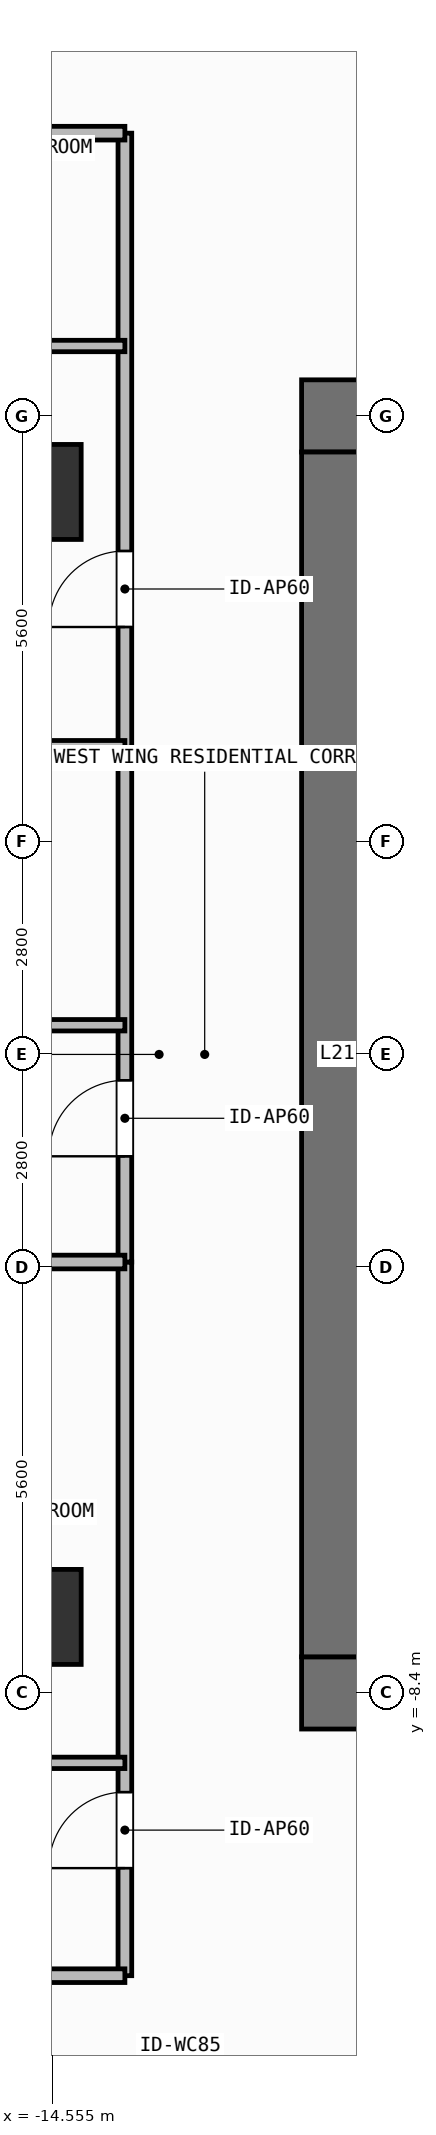
"""IFC4 building model, lengths in metres.
Left out: names, types, materials, properties, quantities, classifications, styles, units other than length and angle.
Written with IfcOpenShell. Run it as: python <this file> out.ifc"""

import sys

from ifc_helpers import new_model, si_unit, direction, frame, frame_2d, origin, origin_2d, place, context, subcontext, project, spatial, rectangle, extrude, element, fill, save


model = new_model("IFC4")
c1 = context("Model", 3, precision=1e-05, world=origin(), true_north=direction((0.0, 1.0)))
c2 = subcontext(c1, "Body", "Model", "MODEL_VIEW")
j1 = project(units=[si_unit("LENGTHUNIT", "METRE"), si_unit("PLANEANGLEUNIT", "RADIAN")], contexts=[c1])
p1 = place(None, origin())
s1 = spatial("IfcSite", under=j1, at=p1, CompositionType="ELEMENT")
p2 = place(p1, origin())
s2 = spatial("IfcBuilding", under=s1, at=p2, CompositionType="ELEMENT")
p3 = place(p2, frame((0.0, 0.0, 85.2)))
s3 = spatial("IfcBuildingStorey", under=s2, at=p3, CompositionType="ELEMENT", Elevation=85.2)
for number, where, z_axis, x_axis in (
    (1, (-11.275, -8.4, 0.0), (0.0, 0.0, 1.0), (1.0, 0.0, 0.0)),
    (2, (-11.275, 8.4, 0.0), (0.0, 0.0, 1.0), (1.0, 0.0, 0.0)),
):
    element("IfcWall", number, at=place(p3, frame(where, z_axis=z_axis, x_axis=x_axis)), inside=s3, PredefinedType="SHEAR", context=c2, shape_type="SweptSolid", body=[
        extrude(rectangle(XDim=1.575, YDim=0.95, at=frame_2d((0.788, 0.0))), origin(), (0.0, 0.0, 1.0), 3.9),
    ])
p4 = place(p3, frame((-10.8, -7.925, 0.0), z_axis=(0.0, 0.0, 1.0), x_axis=(0.0, 1.0, 0.0)))
e3 = element("IfcWall", 3, at=p4, inside=s3, PredefinedType="SHEAR", context=c2, shape_type="SweptSolid", body=[
    extrude(rectangle(XDim=15.85, YDim=0.95, at=frame_2d((7.925, 0.0))), origin(), (0.0, 0.0, 1.0), 3.9),
])
for number, where, z_axis, x_axis in (
    (4, (-14.8, -7.4, 0.0), (0.0, 0.0, 1.0), (1.0, 0.0, 0.0)),
    (5, (-14.8, 7.4, 0.0), (0.0, 0.0, 1.0), (1.0, 0.0, 0.0)),
):
    element("IfcColumn", number, at=place(p3, frame(where, z_axis=z_axis, x_axis=x_axis)), inside=s3, PredefinedType="COLUMN", context=c2, shape_type="SweptSolid", body=[
        extrude(rectangle(XDim=1.25, YDim=1.25, at=origin_2d()), origin(), (0.0, 0.0, 1.0), 3.9),
    ])
p5 = place(p3, frame((-13.6, -12.12, 0.0), z_axis=(0.0, 0.0, 1.0), x_axis=(0.0, 1.0, 0.0)))
e6 = element("IfcWall", 6, at=p5, inside=s3, PredefinedType="PARTITIONING", context=c2, shape_type="SweptSolid", body=[
    extrude(rectangle(XDim=9.389, YDim=0.18, at=frame_2d((4.695, 0.0))), origin(), (0.0, 0.0, 1.0), 3.68),
])
p6 = place(p5, frame((1.415, 0.0, 0.0)))
e7 = element("IfcOpeningElement", 7, at=p6, cuts=e6, PredefinedType="OPENING", context=c2, shape_type="SweptSolid", body=[
    extrude(rectangle(XDim=1.0, YDim=2.2, at=frame_2d((0.5, 1.1))), frame((0.0, 0.1, 0.0), z_axis=(0.0, -1.0, 0.0), x_axis=(1.0, 0.0, 0.0)), (0.0, 0.0, 1.0), 0.2),
])
p7 = place(p3, frame((-16.863, -9.32, 0.0), z_axis=(0.0, 0.0, 1.0), x_axis=(1.0, 0.0, 0.0)))
e8 = element("IfcWall", 8, at=p7, inside=s3, PredefinedType="PARTITIONING", context=c2, shape_type="SweptSolid", body=[
    extrude(rectangle(XDim=3.263, YDim=0.15, at=frame_2d((1.631, 0.0))), origin(), (0.0, 0.0, 1.0), 3.68),
])
p8 = place(p7, frame((0.509, 0.0, 0.0)))
e9 = element("IfcOpeningElement", 9, at=p8, cuts=e8, PredefinedType="OPENING", context=c2, shape_type="SweptSolid", body=[
    extrude(rectangle(XDim=0.85, YDim=2.1, at=frame_2d((0.425, 1.05))), frame((0.0, 0.085, 0.0), z_axis=(0.0, -1.0, 0.0), x_axis=(1.0, 0.0, 0.0)), (0.0, 0.0, 1.0), 0.17),
])
p9 = place(p3, frame((-13.6, -2.731, 0.0), z_axis=(0.0, 0.0, 1.0), x_axis=(0.0, 1.0, 0.0)))
e10 = element("IfcWall", 10, at=p9, inside=s3, PredefinedType="PARTITIONING", context=c2, shape_type="SweptSolid", body=[
    extrude(rectangle(XDim=6.771, YDim=0.18, at=frame_2d((3.385, 0.0))), origin(), (0.0, 0.0, 1.0), 3.68),
])
p10 = place(p9, frame((1.391, 0.0, 0.0)))
e11 = element("IfcOpeningElement", 11, at=p10, cuts=e10, PredefinedType="OPENING", context=c2, shape_type="SweptSolid", body=[
    extrude(rectangle(XDim=1.0, YDim=2.2, at=frame_2d((0.5, 1.1))), frame((0.0, 0.1, 0.0), z_axis=(0.0, -1.0, 0.0), x_axis=(1.0, 0.0, 0.0)), (0.0, 0.0, 1.0), 0.2),
])
p11 = place(p3, frame((-16.902, 0.384, 0.0), z_axis=(0.0, 0.0, 1.0), x_axis=(1.0, 0.0, 0.0)))
e12 = element("IfcWall", 12, at=p11, inside=s3, PredefinedType="PARTITIONING", context=c2, shape_type="SweptSolid", body=[
    extrude(rectangle(XDim=3.302, YDim=0.15, at=frame_2d((1.651, 0.0))), origin(), (0.0, 0.0, 1.0), 3.68),
])
p12 = place(p11, frame((1.226, 0.0, 0.0)))
e13 = element("IfcOpeningElement", 13, at=p12, cuts=e12, PredefinedType="OPENING", context=c2, shape_type="SweptSolid", body=[
    extrude(rectangle(XDim=0.85, YDim=2.1, at=frame_2d((0.425, 1.05))), frame((0.0, 0.085, 0.0), z_axis=(0.0, -1.0, 0.0), x_axis=(1.0, 0.0, 0.0)), (0.0, 0.0, 1.0), 0.17),
])
p13 = place(p3, frame((-13.6, 4.04, 0.0), z_axis=(0.0, 0.0, 1.0), x_axis=(0.0, 1.0, 0.0)))
e14 = element("IfcWall", 14, at=p13, inside=s3, PredefinedType="PARTITIONING", context=c2, shape_type="SweptSolid", body=[
    extrude(rectangle(XDim=8.08, YDim=0.18, at=frame_2d((4.04, 0.0))), origin(), (0.0, 0.0, 1.0), 3.68),
])
p14 = place(p13, frame((1.583, 0.0, 0.0)))
e15 = element("IfcOpeningElement", 15, at=p14, cuts=e14, PredefinedType="OPENING", context=c2, shape_type="SweptSolid", body=[
    extrude(rectangle(XDim=1.0, YDim=2.2, at=frame_2d((0.5, 1.1))), frame((0.0, 0.1, 0.0), z_axis=(0.0, -1.0, 0.0), x_axis=(1.0, 0.0, 0.0)), (0.0, 0.0, 1.0), 0.2),
])
p15 = place(p3, frame((-16.902, 9.32, 0.0), z_axis=(0.0, 0.0, 1.0), x_axis=(1.0, 0.0, 0.0)))
e16 = element("IfcWall", 16, at=p15, inside=s3, PredefinedType="PARTITIONING", context=c2, shape_type="SweptSolid", body=[
    extrude(rectangle(XDim=3.302, YDim=0.15, at=frame_2d((1.651, 0.0))), origin(), (0.0, 0.0, 1.0), 3.68),
])
p16 = place(p15, frame((0.515, 0.0, 0.0)))
e17 = element("IfcOpeningElement", 17, at=p16, cuts=e16, PredefinedType="OPENING", context=c2, shape_type="SweptSolid", body=[
    extrude(rectangle(XDim=0.85, YDim=2.1, at=frame_2d((0.425, 1.05))), frame((0.0, 0.085, 0.0), z_axis=(0.0, -1.0, 0.0), x_axis=(1.0, 0.0, 0.0)), (0.0, 0.0, 1.0), 0.17),
])
for number, where, z_axis, x_axis in (
    (18, (-27.93, -2.731, 0.0), (0.0, 0.0, 1.0), (1.0, 0.0, 0.0)),
    (19, (-27.93, 4.04, 0.0), (0.0, 0.0, 1.0), (1.0, 0.0, 0.0)),
    (20, (-27.93, -12.12, 0.0), (0.0, 0.0, 1.0), (1.0, 0.0, 0.0)),
    (21, (-27.93, 12.12, 0.0), (0.0, 0.0, 1.0), (1.0, 0.0, 0.0)),
):
    element("IfcWall", number, at=place(p3, frame(where, z_axis=z_axis, x_axis=x_axis)), inside=s3, PredefinedType="PARTITIONING", context=c2, shape_type="SweptSolid", body=[
        extrude(rectangle(XDim=14.33, YDim=0.18, at=frame_2d((7.165, 0.0))), origin(), (0.0, 0.0, 1.0), 3.68),
    ])
p17 = place(p6, origin())
e22 = element("IfcDoor", 22, at=p17, inside=s3, OperationType="SINGLE_SWING_LEFT", PredefinedType="DOOR", context=c2, shape_type="SweptSolid", body=[
    extrude(rectangle(XDim=1.0, YDim=2.2, at=frame_2d((0.5, 1.1))), frame((0.0, 0.025, 0.0), z_axis=(0.0, -1.0, 0.0), x_axis=(1.0, 0.0, 0.0)), (0.0, 0.0, 1.0), 0.05),
])
fill(e7, e22)
p18 = place(p10, origin())
e23 = element("IfcDoor", 23, at=p18, inside=s3, OperationType="SINGLE_SWING_LEFT", PredefinedType="DOOR", context=c2, shape_type="SweptSolid", body=[
    extrude(rectangle(XDim=1.0, YDim=2.2, at=frame_2d((0.5, 1.1))), frame((0.0, 0.025, 0.0), z_axis=(0.0, -1.0, 0.0), x_axis=(1.0, 0.0, 0.0)), (0.0, 0.0, 1.0), 0.05),
])
fill(e11, e23)
p19 = place(p14, origin())
e24 = element("IfcDoor", 24, at=p19, inside=s3, OperationType="SINGLE_SWING_LEFT", PredefinedType="DOOR", context=c2, shape_type="SweptSolid", body=[
    extrude(rectangle(XDim=1.0, YDim=2.2, at=frame_2d((0.5, 1.1))), frame((0.0, 0.025, 0.0), z_axis=(0.0, -1.0, 0.0), x_axis=(1.0, 0.0, 0.0)), (0.0, 0.0, 1.0), 0.05),
])
fill(e15, e24)
save(model, sys.argv[1])
